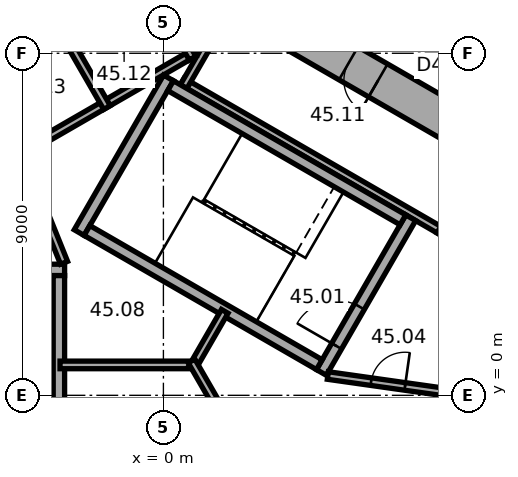
"""IFC4 building model, lengths in metres.
Left out: names, types, materials, properties, quantities, classifications, styles, units other than length and angle.
Written with IfcOpenShell. Run it as: python <this file> out.ifc"""

import sys

from ifc_helpers import new_model, si_unit, direction, frame, frame_2d, origin, place, context, subcontext, project, spatial, rectangle, extrude, element, fill, save


model = new_model("IFC4")
c1 = context("Model", 3, precision=1e-05, world=origin(), true_north=direction((0.0, 1.0)))
c2 = subcontext(c1, "Body", "Model", "MODEL_VIEW")
j1 = project(units=[si_unit("LENGTHUNIT", "METRE"), si_unit("PLANEANGLEUNIT", "RADIAN")], contexts=[c1])
p1 = place(None, origin())
s1 = spatial("IfcSite", under=j1, at=p1, CompositionType="ELEMENT")
p2 = place(p1, origin())
s2 = spatial("IfcBuilding", under=s1, at=p2, CompositionType="ELEMENT")
p3 = place(p2, frame((0.0, 0.0, 183.6)))
s3 = spatial("IfcBuildingStorey", under=s2, at=p3, CompositionType="ELEMENT", Elevation=183.6)
p4 = place(p3, frame((10.25, 5.629, 0.0), z_axis=(0.0, 0.0, 1.0), x_axis=(-0.866022616891, 0.50000482701, 0.0)))
e1 = element("IfcWall", 1, at=p4, inside=s3, PredefinedType="SHEAR", context=c2, shape_type="SweptSolid", body=[
    extrude(rectangle(XDim=12.125, YDim=1.0, at=frame_2d((6.062, 0.0))), origin(), (0.0, 0.0, 1.0), 3.7),
])
p5 = place(p4, frame((5.312, 0.0, 0.0)))
e2 = element("IfcOpeningElement", 2, at=p5, cuts=e1, PredefinedType="OPENING", context=c2, shape_type="SweptSolid", body=[
    extrude(rectangle(XDim=0.9, YDim=2.1, at=frame_2d((0.45, 1.05))), frame((0.0, 0.51, 0.0), z_axis=(0.0, -1.0, 0.0), x_axis=(1.0, 0.0, 0.0)), (0.0, 0.0, 1.0), 1.02),
])
p6 = place(p3, frame((0.25, 11.691, 0.0), z_axis=(0.0, 0.0, 1.0), x_axis=(-0.866022616891, -0.50000482701, 0.0)))
e3 = element("IfcWall", 3, at=p6, inside=s3, PredefinedType="SHEAR", context=c2, shape_type="SweptSolid", body=[
    extrude(rectangle(XDim=12.125, YDim=1.0, at=frame_2d((6.062, 0.0))), origin(), (0.0, 0.0, 1.0), 3.7),
])
p7 = place(p6, frame((6.262, 0.0, 0.0)))
e4 = element("IfcOpeningElement", 4, at=p7, cuts=e3, PredefinedType="OPENING", context=c2, shape_type="SweptSolid", body=[
    extrude(rectangle(XDim=1.5, YDim=2.1, at=frame_2d((0.75, 1.05))), frame((0.0, 0.51, 0.0), z_axis=(0.0, -1.0, 0.0), x_axis=(1.0, 0.0, 0.0)), (0.0, 0.0, 1.0), 1.02),
])
p8 = place(p6, frame((1.812, 0.0, 0.0)))
e5 = element("IfcOpeningElement", 5, at=p8, cuts=e3, PredefinedType="OPENING", context=c2, shape_type="SweptSolid", body=[
    extrude(rectangle(XDim=0.9, YDim=2.1, at=frame_2d((0.45, 1.05))), frame((0.0, 0.51, 0.0), z_axis=(0.0, -1.0, 0.0), x_axis=(1.0, 0.0, 0.0)), (0.0, 0.0, 1.0), 1.02),
])
p9 = place(p6, frame((4.412, 0.0, 0.0)))
e6 = element("IfcOpeningElement", 6, at=p9, cuts=e3, PredefinedType="OPENING", context=c2, shape_type="SweptSolid", body=[
    extrude(rectangle(XDim=0.9, YDim=2.1, at=frame_2d((0.45, 1.05))), frame((0.0, 0.51, 0.0), z_axis=(0.0, -1.0, 0.0), x_axis=(1.0, 0.0, 0.0)), (0.0, 0.0, 1.0), 1.02),
])
p10 = place(p3, frame((7.424, 4.259, 0.0), z_axis=(0.0, 0.0, 1.0), x_axis=(-0.866026010844, 0.49999894854, 0.0)))
e7 = element("IfcWall", 7, at=p10, inside=s3, PredefinedType="PARTITIONING", context=c2, shape_type="SweptSolid", body=[
    extrude(rectangle(XDim=8.0, YDim=0.2, at=frame_2d((4.0, 0.0))), origin(), (0.0, 0.0, 1.0), 3.42),
])
for number, where, z_axis, x_axis in (
    (8, (7.287, 4.222, 0.0), (0.0, 0.0, 1.0), (0.5, 0.866, 0.0)),
    (9, (0.532, 8.122, 0.0), (0.0, 0.0, 1.0), (0.5, 0.866, 0.0)),
):
    element("IfcWall", number, at=place(p3, frame(where, z_axis=z_axis, x_axis=x_axis)), inside=s3, PredefinedType="PARTITIONING", context=c2, shape_type="SweptSolid", body=[
        extrude(rectangle(XDim=2.2, YDim=0.2, at=frame_2d((1.1, 0.0))), origin(), (0.0, 0.0, 1.0), 3.42),
    ])
p11 = place(p3, frame((0.803, 9.009, 0.0), z_axis=(0.0, 0.0, 1.0), x_axis=(-0.866028230842, -0.499995103361, 0.0)))
e10 = element("IfcWall", 10, at=p11, inside=s3, PredefinedType="PARTITIONING", context=c2, shape_type="SweptSolid", body=[
    extrude(rectangle(XDim=5.4, YDim=0.2, at=frame_2d((2.7, 0.0))), origin(), (0.0, 0.0, 1.0), 3.42),
])
p12 = place(p3, frame((0.767, 8.872, 0.0), z_axis=(0.0, 0.0, 1.0), x_axis=(-0.499994660107, 0.866028486751, 0.0)))
e11 = element("IfcWall", 11, at=p12, inside=s3, PredefinedType="PARTITIONING", context=c2, shape_type="SweptSolid", body=[
    extrude(rectangle(XDim=2.2, YDim=0.2, at=frame_2d((1.1, 0.0))), origin(), (0.0, 0.0, 1.0), 3.42),
])
p13 = place(p3, frame((-1.485, 7.572, 0.0), z_axis=(0.0, 0.0, 1.0), x_axis=(-0.50002983664, 0.866008176907, 0.0)))
e12 = element("IfcWall", 12, at=p13, inside=s3, PredefinedType="PARTITIONING", context=c2, shape_type="SweptSolid", body=[
    extrude(rectangle(XDim=2.2, YDim=0.2, at=frame_2d((1.1, 0.0))), origin(), (0.0, 0.0, 1.0), 3.42),
])
p14 = place(p3, frame((4.158, 0.602, 0.0), z_axis=(0.0, 0.0, 1.0), x_axis=(0.499977259774, 0.866038532462, 0.0)))
e13 = element("IfcWall", 13, at=p14, inside=s3, PredefinedType="SHEAR", context=c2, shape_type="SweptSolid", body=[
    extrude(rectangle(XDim=4.7, YDim=0.3, at=frame_2d((2.35, 0.0))), origin(), (0.0, 0.0, 1.0), 3.42),
])
p15 = place(p14, frame((0.8, 0.0, 0.0)))
e14 = element("IfcOpeningElement", 14, at=p15, cuts=e13, PredefinedType="OPENING", context=c2, shape_type="SweptSolid", body=[
    extrude(rectangle(XDim=1.2, YDim=2.1, at=frame_2d((0.6, 1.05))), frame((0.0, 0.16, 0.0), z_axis=(0.0, -1.0, 0.0), x_axis=(1.0, 0.0, 0.0)), (0.0, 0.0, 1.0), 0.32),
])
p16 = place(p3, frame((-2.216, 4.282, 0.0), z_axis=(0.0, 0.0, 1.0), x_axis=(0.499977259774, 0.866038532462, 0.0)))
e15 = element("IfcWall", 15, at=p16, inside=s3, PredefinedType="SHEAR", context=c2, shape_type="SweptSolid", body=[
    extrude(rectangle(XDim=4.7, YDim=0.3, at=frame_2d((2.35, 0.0))), origin(), (0.0, 0.0, 1.0), 3.42),
])
for number, where, z_axis, x_axis in (
    (16, (4.103, 0.807, 0.0), (0.0, 0.0, 1.0), (-0.866, 0.5, 0.0)),
    (17, (6.303, 4.617, 0.0), (0.0, 0.0, 1.0), (-0.866, 0.5, 0.0)),
):
    element("IfcWall", number, at=place(p3, frame(where, z_axis=z_axis, x_axis=x_axis)), inside=s3, PredefinedType="SHEAR", context=c2, shape_type="SweptSolid", body=[
        extrude(rectangle(XDim=7.06, YDim=0.3, at=frame_2d((3.53, 0.0))), origin(), (0.0, 0.0, 1.0), 3.42),
    ])
p17 = place(p3, frame((-2.6, 3.3, 0.0), z_axis=(0.0, 0.0, 1.0), x_axis=(-1.0, 0.0, 0.0)))
e18 = element("IfcWall", 18, at=p17, inside=s3, PredefinedType="SHEAR", context=c2, shape_type="SweptSolid", body=[
    extrude(rectangle(XDim=4.7, YDim=0.3, at=frame_2d((2.35, 0.0))), origin(), (0.0, 0.0, 1.0), 3.42),
])
p18 = place(p17, frame((0.8, 0.0, 0.0)))
e19 = element("IfcOpeningElement", 19, at=p18, cuts=e18, PredefinedType="OPENING", context=c2, shape_type="SweptSolid", body=[
    extrude(rectangle(XDim=1.2, YDim=2.1, at=frame_2d((0.6, 1.05))), frame((0.0, 0.16, 0.0), z_axis=(0.0, -1.0, 0.0), x_axis=(1.0, 0.0, 0.0)), (0.0, 0.0, 1.0), 0.32),
])
p19 = place(p3, frame((-2.75, 3.15, 0.0), z_axis=(0.0, 0.0, 1.0), x_axis=(0.0, -1.0, 0.0)))
e20 = element("IfcWall", 20, at=p19, inside=s3, PredefinedType="SHEAR", context=c2, shape_type="SweptSolid", body=[
    extrude(rectangle(XDim=7.06, YDim=0.3, at=frame_2d((3.53, 0.0))), origin(), (0.0, 0.0, 1.0), 3.42),
])
p20 = place(p3, frame((4.327, 0.521, 0.0), z_axis=(0.0, 0.0, 1.0), x_axis=(0.990124376366, -0.14019172346, 0.0)))
e21 = element("IfcWall", 21, at=p20, inside=s3, PredefinedType="PARTITIONING", context=c2, shape_type="SweptSolid", body=[
    extrude(rectangle(XDim=3.002, YDim=0.2, at=frame_2d((1.501, 0.0))), origin(), (0.0, 0.0, 1.0), 3.42),
])
p21 = place(p20, frame((1.15, 0.0, 0.0)))
e22 = element("IfcOpeningElement", 22, at=p21, cuts=e21, PredefinedType="OPENING", context=c2, shape_type="SweptSolid", body=[
    extrude(rectangle(XDim=0.9, YDim=2.1, at=frame_2d((0.45, 1.05))), frame((0.0, 0.11, 0.0), z_axis=(0.0, -1.0, 0.0), x_axis=(1.0, 0.0, 0.0)), (0.0, 0.0, 1.0), 0.22),
])
p22 = place(p3, frame((-2.615, 3.487, 0.0), z_axis=(0.0, 0.0, 1.0), x_axis=(-0.373576831041, 0.92759924068, 0.0)))
e23 = element("IfcWall", 23, at=p22, inside=s3, PredefinedType="PARTITIONING", context=c2, shape_type="SweptSolid", body=[
    extrude(rectangle(XDim=3.002, YDim=0.2, at=frame_2d((1.501, 0.0))), origin(), (0.0, 0.0, 1.0), 3.42),
])
p23 = place(p22, frame((1.15, 0.0, 0.0)))
e24 = element("IfcOpeningElement", 24, at=p23, cuts=e23, PredefinedType="OPENING", context=c2, shape_type="SweptSolid", body=[
    extrude(rectangle(XDim=0.9, YDim=2.1, at=frame_2d((0.45, 1.05))), frame((0.0, 0.11, 0.0), z_axis=(0.0, -1.0, 0.0), x_axis=(1.0, 0.0, 0.0)), (0.0, 0.0, 1.0), 0.22),
])
p24 = place(p3, frame((0.92, 0.8, 0.0), z_axis=(0.0, 0.0, 1.0), x_axis=(-1.0, 0.0, 0.0)))
e25 = element("IfcWall", 25, at=p24, inside=s3, PredefinedType="PARTITIONING", context=c2, shape_type="SweptSolid", body=[
    extrude(rectangle(XDim=3.64, YDim=0.2, at=frame_2d((1.82, 0.0))), origin(), (0.0, 0.0, 1.0), 3.42),
])
p25 = place(p3, frame((0.74, 0.696, 0.0), z_axis=(0.0, 0.0, 1.0), x_axis=(0.499956301907, 0.86605063142, 0.0)))
e26 = element("IfcWall", 26, at=p25, inside=s3, PredefinedType="PARTITIONING", context=c2, shape_type="SweptSolid", body=[
    extrude(rectangle(XDim=1.747, YDim=0.2, at=frame_2d((0.874, 0.0))), origin(), (0.0, 0.0, 1.0), 3.42),
])
p26 = place(p3, frame((0.74, 0.904, 0.0), z_axis=(0.0, 0.0, 1.0), x_axis=(0.500028278809, -0.866009076391, 0.0)))
e27 = element("IfcWall", 27, at=p26, inside=s3, PredefinedType="PARTITIONING", context=c2, shape_type="SweptSolid", body=[
    extrude(rectangle(XDim=3.133, YDim=0.2, at=frame_2d((1.566, 0.0))), origin(), (0.0, 0.0, 1.0), 3.42),
])
p27 = place(p3, frame((11.196, 7.854, 0.0), z_axis=(0.0, 0.0, 1.0), x_axis=(-0.866023877043, 0.500002644385, 0.0)))
e28 = element("IfcWall", 28, at=p27, inside=s3, PredefinedType="PARTITIONING", context=c2, shape_type="SweptSolid", body=[
    extrude(rectangle(XDim=11.792, YDim=0.2, at=frame_2d((5.896, 0.0))), origin(), (0.0, 0.0, 1.0), 3.42),
])
p28 = place(p27, frame((3.261, 0.0, 0.0)))
e29 = element("IfcOpeningElement", 29, at=p28, cuts=e28, PredefinedType="OPENING", context=c2, shape_type="SweptSolid", body=[
    extrude(rectangle(XDim=1.0, YDim=2.1, at=frame_2d((0.5, 1.05))), frame((0.0, 0.11, 0.0), z_axis=(0.0, -1.0, 0.0), x_axis=(1.0, 0.0, 0.0)), (0.0, 0.0, 1.0), 0.22),
])
p29 = place(p15, origin())
e30 = element("IfcDoor", 30, at=p29, inside=s3, OperationType="SINGLE_SWING_RIGHT", PredefinedType="DOOR", context=c2, shape_type="SweptSolid", body=[
    extrude(rectangle(XDim=1.2, YDim=2.1, at=frame_2d((0.6, 1.05))), frame((0.0, 0.025, 0.0), z_axis=(0.0, -1.0, 0.0), x_axis=(1.0, 0.0, 0.0)), (0.0, 0.0, 1.0), 0.05),
])
fill(e14, e30)
p30 = place(p21, origin())
e31 = element("IfcDoor", 31, at=p30, inside=s3, OperationType="SINGLE_SWING_LEFT", PredefinedType="DOOR", context=c2, shape_type="SweptSolid", body=[
    extrude(rectangle(XDim=0.9, YDim=2.1, at=frame_2d((0.45, 1.05))), frame((0.0, 0.025, 0.0), z_axis=(0.0, -1.0, 0.0), x_axis=(1.0, 0.0, 0.0)), (0.0, 0.0, 1.0), 0.05),
])
fill(e22, e31)
p31 = place(p5, origin())
e32 = element("IfcDoor", 32, at=p31, inside=s3, OperationType="SINGLE_SWING_LEFT", PredefinedType="DOOR", context=c2, shape_type="SweptSolid", body=[
    extrude(rectangle(XDim=0.9, YDim=2.1, at=frame_2d((0.45, 1.05))), frame((0.0, 0.025, 0.0), z_axis=(0.0, -1.0, 0.0), x_axis=(1.0, 0.0, 0.0)), (0.0, 0.0, 1.0), 0.05),
])
fill(e2, e32)
save(model, sys.argv[1])
